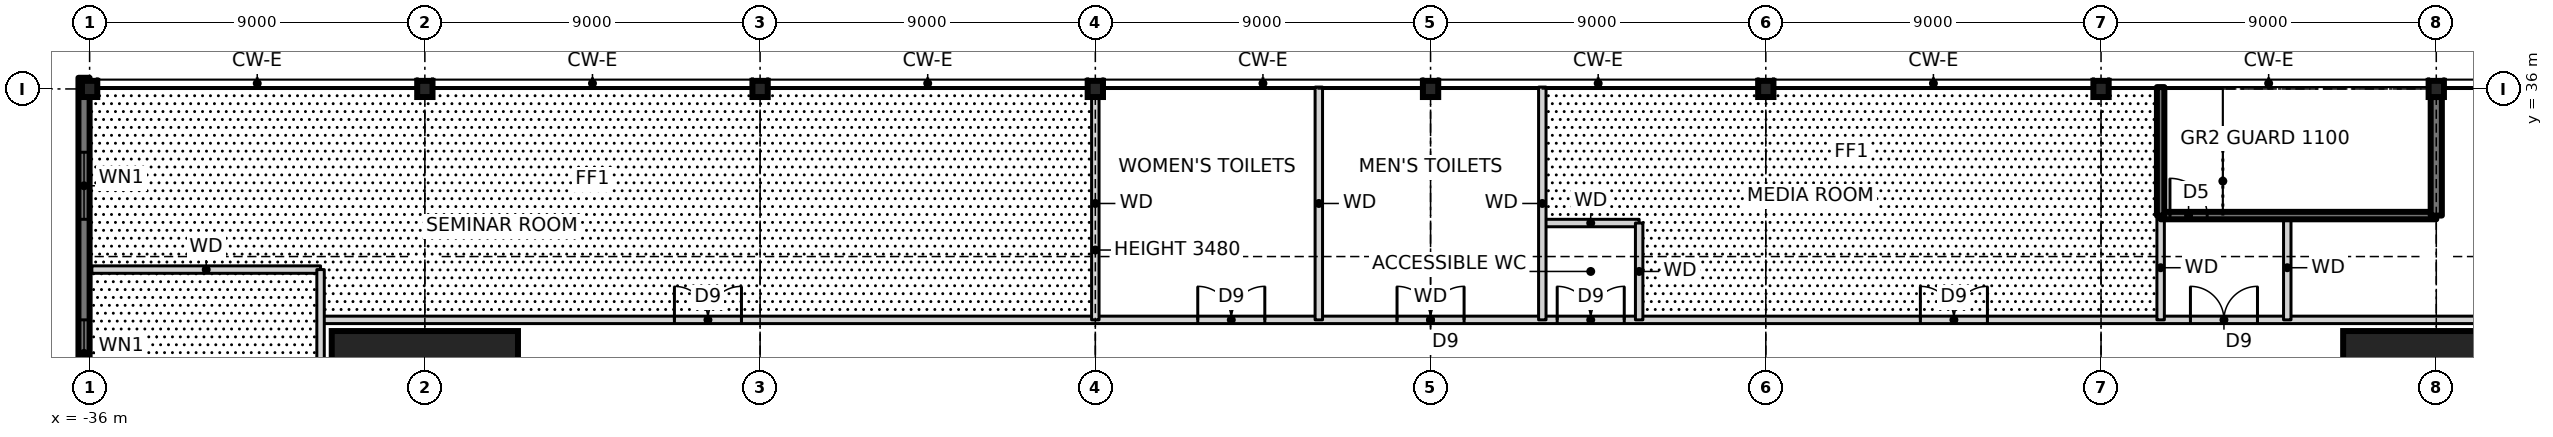
"""IFC4 building model, lengths in metres.
Left out: names, types, materials, properties, quantities, classifications, styles, units other than length and angle.
Written with IfcOpenShell. Run it as: python <this file> out.ifc"""

import sys

from ifc_helpers import new_model, si_unit, direction, frame, frame_2d, origin, origin_2d, place, context, subcontext, project, spatial, rectangle, i_section, extrude, element, fill, save


model = new_model("IFC4")
c1 = context("Model", 3, precision=1e-05, world=origin(), true_north=direction((0.0, 1.0)))
c2 = subcontext(c1, "Body", "Model", "MODEL_VIEW")
j1 = project(units=[si_unit("LENGTHUNIT", "METRE"), si_unit("PLANEANGLEUNIT", "RADIAN")], contexts=[c1])
p1 = place(None, origin())
s1 = spatial("IfcSite", under=j1, at=p1, CompositionType="ELEMENT")
p2 = place(p1, origin())
s2 = spatial("IfcBuilding", under=s1, at=p2, CompositionType="ELEMENT")
p3 = place(p2, frame((0.0, 0.0, 10.5)))
s3 = spatial("IfcBuildingStorey", under=s2, at=p3, CompositionType="ELEMENT", Elevation=10.5)
for number, where, z_axis, x_axis in (
    (1, (27.0, 27.0, 0.0), (0.0, 0.0, 1.0), (1.0, 0.0, 0.0)),
    (2, (-27.0, 27.0, 0.0), (0.0, 0.0, 1.0), (1.0, 0.0, 0.0)),
):
    element("IfcColumn", number, at=place(p3, frame(where, z_axis=z_axis, x_axis=x_axis)), inside=s3, PredefinedType="COLUMN", context=c2, shape_type="SweptSolid", body=[
        extrude(rectangle(XDim=5.0, YDim=5.0, at=origin_2d()), origin(), (0.0, 0.0, 1.0), 4.5),
        extrude(i_section(OverallWidth=0.478, OverallDepth=0.599, WebThickness=0.1, FlangeThickness=0.14, at=origin_2d()), origin(), (0.0, 0.0, 1.0), 4.5),
    ])
for number, where, z_axis, x_axis in (
    (3, (-36.0, 36.0, 0.0), (0.0, 0.0, 1.0), (1.0, 0.0, 0.0)),
    (4, (-27.0, 36.0, 0.0), (0.0, 0.0, 1.0), (1.0, 0.0, 0.0)),
    (5, (-18.0, 36.0, 0.0), (0.0, 0.0, 1.0), (1.0, 0.0, 0.0)),
    (6, (-9.0, 36.0, 0.0), (0.0, 0.0, 1.0), (1.0, 0.0, 0.0)),
    (7, (0.0, 36.0, 0.0), (0.0, 0.0, 1.0), (1.0, 0.0, 0.0)),
    (8, (9.0, 36.0, 0.0), (0.0, 0.0, 1.0), (1.0, 0.0, 0.0)),
    (9, (18.0, 36.0, 0.0), (0.0, 0.0, 1.0), (1.0, 0.0, 0.0)),
    (10, (27.0, 36.0, 0.0), (0.0, 0.0, 1.0), (1.0, 0.0, 0.0)),
):
    element("IfcColumn", number, at=place(p3, frame(where, z_axis=z_axis, x_axis=x_axis)), inside=s3, PredefinedType="COLUMN", context=c2, shape_type="SweptSolid", body=[
        extrude(i_section(OverallWidth=0.411, OverallDepth=0.434, WebThickness=0.036, FlangeThickness=0.057, at=origin_2d()), origin(), (0.0, 0.0, 1.0), 4.5),
    ])
p4 = place(p3, frame((-36.15, 36.3, -0.25), z_axis=(0.0, 0.0, 1.0), x_axis=(0.0, -1.0, 0.0)))
e11 = element("IfcWall", 11, at=p4, inside=s3, PredefinedType="SOLIDWALL", context=c2, shape_type="SweptSolid", body=[
    extrude(rectangle(XDim=72.6, YDim=0.3, at=frame_2d((36.3, 0.0))), origin(), (0.0, 0.0, 1.0), 4.75),
])
p5 = place(p4, frame((2.0, 0.0, 1.15)))
e12 = element("IfcOpeningElement", 12, at=p5, cuts=e11, PredefinedType="OPENING", context=c2, shape_type="SweptSolid", body=[
    extrude(rectangle(XDim=1.8, YDim=2.4, at=frame_2d((0.9, 1.2))), frame((0.0, 0.16, 0.0), z_axis=(0.0, -1.0, 0.0), x_axis=(1.0, 0.0, 0.0)), (0.0, 0.0, 1.0), 0.32),
])
p6 = place(p4, frame((6.5, 0.0, 1.15)))
e13 = element("IfcOpeningElement", 13, at=p6, cuts=e11, PredefinedType="OPENING", context=c2, shape_type="SweptSolid", body=[
    extrude(rectangle(XDim=1.8, YDim=2.4, at=frame_2d((0.9, 1.2))), frame((0.0, 0.16, 0.0), z_axis=(0.0, -1.0, 0.0), x_axis=(1.0, 0.0, 0.0)), (0.0, 0.0, 1.0), 0.32),
])
p7 = place(p4, frame((11.0, 0.0, 1.15)))
e14 = element("IfcOpeningElement", 14, at=p7, cuts=e11, PredefinedType="OPENING", context=c2, shape_type="SweptSolid", body=[
    extrude(rectangle(XDim=1.8, YDim=2.4, at=frame_2d((0.9, 1.2))), frame((0.0, 0.16, 0.0), z_axis=(0.0, -1.0, 0.0), x_axis=(1.0, 0.0, 0.0)), (0.0, 0.0, 1.0), 0.32),
])
p8 = place(p4, frame((15.5, 0.0, 1.15)))
e15 = element("IfcOpeningElement", 15, at=p8, cuts=e11, PredefinedType="OPENING", context=c2, shape_type="SweptSolid", body=[
    extrude(rectangle(XDim=1.8, YDim=2.4, at=frame_2d((0.9, 1.2))), frame((0.0, 0.16, 0.0), z_axis=(0.0, -1.0, 0.0), x_axis=(1.0, 0.0, 0.0)), (0.0, 0.0, 1.0), 0.32),
])
p9 = place(p4, frame((20.0, 0.0, 1.15)))
e16 = element("IfcOpeningElement", 16, at=p9, cuts=e11, PredefinedType="OPENING", context=c2, shape_type="SweptSolid", body=[
    extrude(rectangle(XDim=1.8, YDim=2.4, at=frame_2d((0.9, 1.2))), frame((0.0, 0.16, 0.0), z_axis=(0.0, -1.0, 0.0), x_axis=(1.0, 0.0, 0.0)), (0.0, 0.0, 1.0), 0.32),
])
p10 = place(p4, frame((24.5, 0.0, 1.15)))
e17 = element("IfcOpeningElement", 17, at=p10, cuts=e11, PredefinedType="OPENING", context=c2, shape_type="SweptSolid", body=[
    extrude(rectangle(XDim=1.8, YDim=2.4, at=frame_2d((0.9, 1.2))), frame((0.0, 0.16, 0.0), z_axis=(0.0, -1.0, 0.0), x_axis=(1.0, 0.0, 0.0)), (0.0, 0.0, 1.0), 0.32),
])
p11 = place(p4, frame((29.0, 0.0, 1.15)))
e18 = element("IfcOpeningElement", 18, at=p11, cuts=e11, PredefinedType="OPENING", context=c2, shape_type="SweptSolid", body=[
    extrude(rectangle(XDim=1.8, YDim=2.4, at=frame_2d((0.9, 1.2))), frame((0.0, 0.16, 0.0), z_axis=(0.0, -1.0, 0.0), x_axis=(1.0, 0.0, 0.0)), (0.0, 0.0, 1.0), 0.32),
])
p12 = place(p4, frame((42.5, 0.0, 1.15)))
e19 = element("IfcOpeningElement", 19, at=p12, cuts=e11, PredefinedType="OPENING", context=c2, shape_type="SweptSolid", body=[
    extrude(rectangle(XDim=1.8, YDim=2.4, at=frame_2d((0.9, 1.2))), frame((0.0, 0.16, 0.0), z_axis=(0.0, -1.0, 0.0), x_axis=(1.0, 0.0, 0.0)), (0.0, 0.0, 1.0), 0.32),
])
p13 = place(p4, frame((47.0, 0.0, 1.15)))
e20 = element("IfcOpeningElement", 20, at=p13, cuts=e11, PredefinedType="OPENING", context=c2, shape_type="SweptSolid", body=[
    extrude(rectangle(XDim=1.8, YDim=2.4, at=frame_2d((0.9, 1.2))), frame((0.0, 0.16, 0.0), z_axis=(0.0, -1.0, 0.0), x_axis=(1.0, 0.0, 0.0)), (0.0, 0.0, 1.0), 0.32),
])
p14 = place(p4, frame((51.5, 0.0, 1.15)))
e21 = element("IfcOpeningElement", 21, at=p14, cuts=e11, PredefinedType="OPENING", context=c2, shape_type="SweptSolid", body=[
    extrude(rectangle(XDim=1.8, YDim=2.4, at=frame_2d((0.9, 1.2))), frame((0.0, 0.16, 0.0), z_axis=(0.0, -1.0, 0.0), x_axis=(1.0, 0.0, 0.0)), (0.0, 0.0, 1.0), 0.32),
])
p15 = place(p4, frame((56.0, 0.0, 1.15)))
e22 = element("IfcOpeningElement", 22, at=p15, cuts=e11, PredefinedType="OPENING", context=c2, shape_type="SweptSolid", body=[
    extrude(rectangle(XDim=1.8, YDim=2.4, at=frame_2d((0.9, 1.2))), frame((0.0, 0.16, 0.0), z_axis=(0.0, -1.0, 0.0), x_axis=(1.0, 0.0, 0.0)), (0.0, 0.0, 1.0), 0.32),
])
p16 = place(p4, frame((60.5, 0.0, 1.15)))
e23 = element("IfcOpeningElement", 23, at=p16, cuts=e11, PredefinedType="OPENING", context=c2, shape_type="SweptSolid", body=[
    extrude(rectangle(XDim=1.8, YDim=2.4, at=frame_2d((0.9, 1.2))), frame((0.0, 0.16, 0.0), z_axis=(0.0, -1.0, 0.0), x_axis=(1.0, 0.0, 0.0)), (0.0, 0.0, 1.0), 0.32),
])
p17 = place(p4, frame((65.0, 0.0, 1.15)))
e24 = element("IfcOpeningElement", 24, at=p17, cuts=e11, PredefinedType="OPENING", context=c2, shape_type="SweptSolid", body=[
    extrude(rectangle(XDim=1.8, YDim=2.4, at=frame_2d((0.9, 1.2))), frame((0.0, 0.16, 0.0), z_axis=(0.0, -1.0, 0.0), x_axis=(1.0, 0.0, 0.0)), (0.0, 0.0, 1.0), 0.32),
])
p18 = place(p4, frame((69.5, 0.0, 1.15)))
e25 = element("IfcOpeningElement", 25, at=p18, cuts=e11, PredefinedType="OPENING", context=c2, shape_type="SweptSolid", body=[
    extrude(rectangle(XDim=1.8, YDim=2.4, at=frame_2d((0.9, 1.2))), frame((0.0, 0.16, 0.0), z_axis=(0.0, -1.0, 0.0), x_axis=(1.0, 0.0, 0.0)), (0.0, 0.0, 1.0), 0.32),
])
p19 = place(p3, frame((-29.8, 29.8, 0.0), z_axis=(0.0, 0.0, 1.0), x_axis=(1.0, 0.0, 0.0)))
e26 = element("IfcWall", 26, at=p19, inside=s3, PredefinedType="SOLIDWALL", context=c2, shape_type="SweptSolid", body=[
    extrude(rectangle(XDim=59.6, YDim=0.2, at=frame_2d((29.8, 0.0))), origin(), (0.0, 0.0, 1.0), 4.25),
])
p20 = place(p19, frame((9.5, 0.0, 0.0)))
e27 = element("IfcOpeningElement", 27, at=p20, cuts=e26, PredefinedType="OPENING", context=c2, shape_type="SweptSolid", body=[
    extrude(rectangle(XDim=1.8, YDim=2.1, at=frame_2d((0.9, 1.05))), frame((0.0, 0.11, 0.0), z_axis=(0.0, -1.0, 0.0), x_axis=(1.0, 0.0, 0.0)), (0.0, 0.0, 1.0), 0.22),
])
p21 = place(p19, frame((23.55, 0.0, 0.0)))
e28 = element("IfcOpeningElement", 28, at=p21, cuts=e26, PredefinedType="OPENING", context=c2, shape_type="SweptSolid", body=[
    extrude(rectangle(XDim=1.8, YDim=2.1, at=frame_2d((0.9, 1.05))), frame((0.0, 0.11, 0.0), z_axis=(0.0, -1.0, 0.0), x_axis=(1.0, 0.0, 0.0)), (0.0, 0.0, 1.0), 0.22),
])
p22 = place(p19, frame((28.9, 0.0, 0.0)))
e29 = element("IfcOpeningElement", 29, at=p22, cuts=e26, PredefinedType="OPENING", context=c2, shape_type="SweptSolid", body=[
    extrude(rectangle(XDim=1.8, YDim=2.1, at=frame_2d((0.9, 1.05))), frame((0.0, 0.11, 0.0), z_axis=(0.0, -1.0, 0.0), x_axis=(1.0, 0.0, 0.0)), (0.0, 0.0, 1.0), 0.22),
])
p23 = place(p19, frame((33.2, 0.0, 0.0)))
e30 = element("IfcOpeningElement", 30, at=p23, cuts=e26, PredefinedType="OPENING", context=c2, shape_type="SweptSolid", body=[
    extrude(rectangle(XDim=1.8, YDim=2.1, at=frame_2d((0.9, 1.05))), frame((0.0, 0.11, 0.0), z_axis=(0.0, -1.0, 0.0), x_axis=(1.0, 0.0, 0.0)), (0.0, 0.0, 1.0), 0.22),
])
p24 = place(p19, frame((42.95, 0.0, 0.0)))
e31 = element("IfcOpeningElement", 31, at=p24, cuts=e26, PredefinedType="OPENING", context=c2, shape_type="SweptSolid", body=[
    extrude(rectangle(XDim=1.8, YDim=2.1, at=frame_2d((0.9, 1.05))), frame((0.0, 0.11, 0.0), z_axis=(0.0, -1.0, 0.0), x_axis=(1.0, 0.0, 0.0)), (0.0, 0.0, 1.0), 0.22),
])
p25 = place(p19, frame((50.2, 0.0, 0.0)))
e32 = element("IfcOpeningElement", 32, at=p25, cuts=e26, PredefinedType="OPENING", context=c2, shape_type="SweptSolid", body=[
    extrude(rectangle(XDim=1.8, YDim=2.1, at=frame_2d((0.9, 1.05))), frame((0.0, 0.11, 0.0), z_axis=(0.0, -1.0, 0.0), x_axis=(1.0, 0.0, 0.0)), (0.0, 0.0, 1.0), 0.22),
])
p26 = place(p3, frame((-35.94, 31.15, 0.0), z_axis=(0.0, 0.0, 1.0), x_axis=(1.0, 0.0, 0.0)))
e33 = element("IfcWall", 33, at=p26, inside=s3, PredefinedType="SOLIDWALL", context=c2, shape_type="SweptSolid", body=[
    extrude(rectangle(XDim=6.14, YDim=0.2, at=frame_2d((3.07, 0.0))), origin(), (0.0, 0.0, 1.0), 4.25),
])
p27 = place(p3, frame((3.0, 32.4, 0.0), z_axis=(0.0, 0.0, 1.0), x_axis=(1.0, 0.0, 0.0)))
e34 = element("IfcWall", 34, at=p27, inside=s3, PredefinedType="SOLIDWALL", context=c2, shape_type="SweptSolid", body=[
    extrude(rectangle(XDim=2.6, YDim=0.2, at=frame_2d((1.3, 0.0))), origin(), (0.0, 0.0, 1.0), 4.25),
])
p28 = place(p3, frame((19.6, 32.6, 0.0), z_axis=(0.0, 0.0, 1.0), x_axis=(1.0, 0.0, 0.0)))
e35 = element("IfcWall", 35, at=p28, inside=s3, PredefinedType="SOLIDWALL", context=c2, shape_type="SweptSolid", body=[
    extrude(rectangle(XDim=7.4, YDim=0.2, at=frame_2d((3.7, 0.0))), origin(), (0.0, 0.0, 1.0), 4.5),
])
p29 = place(p28, frame((0.25, 0.0, 0.0)))
e36 = element("IfcOpeningElement", 36, at=p29, cuts=e35, PredefinedType="OPENING", context=c2, shape_type="SweptSolid", body=[
    extrude(rectangle(XDim=1.0, YDim=2.1, at=frame_2d((0.5, 1.05))), frame((0.0, 0.11, 0.0), z_axis=(0.0, -1.0, 0.0), x_axis=(1.0, 0.0, 0.0)), (0.0, 0.0, 1.0), 0.22),
])
p30 = place(p3, frame((27.0, 32.6, 0.0), z_axis=(0.0, 0.0, 1.0), x_axis=(0.0, 1.0, 0.0)))
e37 = element("IfcWall", 37, at=p30, inside=s3, PredefinedType="SOLIDWALL", context=c2, shape_type="SweptSolid", body=[
    extrude(rectangle(XDim=3.183, YDim=0.3, at=frame_2d((1.591, 0.0))), origin(), (0.0, 0.0, 1.0), 4.5),
])
for number, where, z_axis, x_axis in (
    (38, (23.0, 29.8, 0.0), (0.0, 0.0, 1.0), (0.0, 1.0, 0.0)),
    (39, (19.6, 29.8, 0.0), (0.0, 0.0, 1.0), (0.0, 1.0, 0.0)),
):
    element("IfcWall", number, at=place(p3, frame(where, z_axis=z_axis, x_axis=x_axis)), inside=s3, PredefinedType="SOLIDWALL", context=c2, shape_type="SweptSolid", body=[
        extrude(rectangle(XDim=2.8, YDim=0.2, at=frame_2d((1.4, 0.0))), origin(), (0.0, 0.0, 1.0), 4.25),
    ])
p31 = place(p3, frame((19.6, 32.6, 0.0), z_axis=(0.0, 0.0, 1.0), x_axis=(0.0, 1.0, 0.0)))
e40 = element("IfcWall", 40, at=p31, inside=s3, PredefinedType="SOLIDWALL", context=c2, shape_type="SweptSolid", body=[
    extrude(rectangle(XDim=3.45, YDim=0.2, at=frame_2d((1.725, 0.0))), origin(), (0.0, 0.0, 1.0), 4.5),
])
p32 = place(p3, frame((5.6, 29.8, 0.0), z_axis=(0.0, 0.0, 1.0), x_axis=(0.0, 1.0, 0.0)))
e41 = element("IfcWall", 41, at=p32, inside=s3, PredefinedType="SOLIDWALL", context=c2, shape_type="SweptSolid", body=[
    extrude(rectangle(XDim=2.6, YDim=0.2, at=frame_2d((1.3, 0.0))), origin(), (0.0, 0.0, 1.0), 4.25),
])
for number, where, z_axis, x_axis in (
    (42, (3.0, 29.8, 0.0), (0.0, 0.0, 1.0), (0.0, 1.0, 0.0)),
    (43, (-3.0, 29.8, 0.0), (0.0, 0.0, 1.0), (0.0, 1.0, 0.0)),
):
    element("IfcWall", number, at=place(p3, frame(where, z_axis=z_axis, x_axis=x_axis)), inside=s3, PredefinedType="SOLIDWALL", context=c2, shape_type="SweptSolid", body=[
        extrude(rectangle(XDim=6.25, YDim=0.2, at=frame_2d((3.125, 0.0))), origin(), (0.0, 0.0, 1.0), 4.25),
    ])
p33 = place(p3, frame((-9.0, 29.8, 0.0), z_axis=(0.0, 0.0, 1.0), x_axis=(0.0, 1.0, 0.0)))
e44 = element("IfcWall", 44, at=p33, inside=s3, PredefinedType="SOLIDWALL", context=c2, shape_type="SweptSolid", body=[
    extrude(rectangle(XDim=6.25, YDim=0.2, at=frame_2d((3.125, 0.0))), origin(), (0.0, 0.0, 1.0), 3.48),
])
p34 = place(p3, frame((-29.8, -31.4, 0.0), z_axis=(0.0, 0.0, 1.0), x_axis=(0.0, 1.0, 0.0)))
e45 = element("IfcWall", 45, at=p34, inside=s3, PredefinedType="SOLIDWALL", context=c2, shape_type="SweptSolid", body=[
    extrude(rectangle(XDim=62.55, YDim=0.2, at=frame_2d((31.275, 0.0))), origin(), (0.0, 0.0, 1.0), 4.25),
])
p35 = place(p34, frame((8.675, 0.0, 0.0)))
e46 = element("IfcOpeningElement", 46, at=p35, cuts=e45, PredefinedType="OPENING", context=c2, shape_type="SweptSolid", body=[
    extrude(rectangle(XDim=1.8, YDim=2.1, at=frame_2d((0.9, 1.05))), frame((0.0, 0.11, 0.0), z_axis=(0.0, -1.0, 0.0), x_axis=(1.0, 0.0, 0.0)), (0.0, 0.0, 1.0), 0.22),
])
p36 = place(p34, frame((25.175, 0.0, 0.0)))
e47 = element("IfcOpeningElement", 47, at=p36, cuts=e45, PredefinedType="OPENING", context=c2, shape_type="SweptSolid", body=[
    extrude(rectangle(XDim=1.8, YDim=2.1, at=frame_2d((0.9, 1.05))), frame((0.0, 0.11, 0.0), z_axis=(0.0, -1.0, 0.0), x_axis=(1.0, 0.0, 0.0)), (0.0, 0.0, 1.0), 0.22),
])
p37 = place(p34, frame((30.5, 0.0, 0.0)))
e48 = element("IfcOpeningElement", 48, at=p37, cuts=e45, PredefinedType="OPENING", context=c2, shape_type="SweptSolid", body=[
    extrude(rectangle(XDim=1.8, YDim=2.1, at=frame_2d((0.9, 1.05))), frame((0.0, 0.11, 0.0), z_axis=(0.0, -1.0, 0.0), x_axis=(1.0, 0.0, 0.0)), (0.0, 0.0, 1.0), 0.22),
])
p38 = place(p34, frame((35.85, 0.0, 0.0)))
e49 = element("IfcOpeningElement", 49, at=p38, cuts=e45, PredefinedType="OPENING", context=c2, shape_type="SweptSolid", body=[
    extrude(rectangle(XDim=1.8, YDim=2.1, at=frame_2d((0.9, 1.05))), frame((0.0, 0.11, 0.0), z_axis=(0.0, -1.0, 0.0), x_axis=(1.0, 0.0, 0.0)), (0.0, 0.0, 1.0), 0.22),
])
p39 = place(p34, frame((49.9, 0.0, 0.0)))
e50 = element("IfcOpeningElement", 50, at=p39, cuts=e45, PredefinedType="OPENING", context=c2, shape_type="SweptSolid", body=[
    extrude(rectangle(XDim=1.8, YDim=2.1, at=frame_2d((0.9, 1.05))), frame((0.0, 0.11, 0.0), z_axis=(0.0, -1.0, 0.0), x_axis=(1.0, 0.0, 0.0)), (0.0, 0.0, 1.0), 0.22),
])
p40 = place(p5, origin())
e51 = element("IfcWindow", 51, at=p40, inside=s3, PartitioningType="SINGLE_PANEL", PredefinedType="WINDOW", context=c2, shape_type="SweptSolid", body=[
    extrude(rectangle(XDim=1.8, YDim=2.4, at=frame_2d((0.9, 1.2))), frame((0.0, 0.03, 0.0), z_axis=(0.0, -1.0, 0.0), x_axis=(1.0, 0.0, 0.0)), (0.0, 0.0, 1.0), 0.06),
])
fill(e12, e51)
p41 = place(p6, origin())
e52 = element("IfcWindow", 52, at=p41, inside=s3, PartitioningType="SINGLE_PANEL", PredefinedType="WINDOW", context=c2, shape_type="SweptSolid", body=[
    extrude(rectangle(XDim=1.8, YDim=2.4, at=frame_2d((0.9, 1.2))), frame((0.0, 0.03, 0.0), z_axis=(0.0, -1.0, 0.0), x_axis=(1.0, 0.0, 0.0)), (0.0, 0.0, 1.0), 0.06),
])
fill(e13, e52)
p42 = place(p20, origin())
e53 = element("IfcDoor", 53, at=p42, inside=s3, OperationType="DOUBLE_DOOR_SINGLE_SWING", PredefinedType="DOOR", context=c2, shape_type="SweptSolid", body=[
    extrude(rectangle(XDim=1.8, YDim=2.1, at=frame_2d((0.9, 1.05))), frame((0.0, 0.025, 0.0), z_axis=(0.0, -1.0, 0.0), x_axis=(1.0, 0.0, 0.0)), (0.0, 0.0, 1.0), 0.05),
])
fill(e27, e53)
p43 = place(p21, origin())
e54 = element("IfcDoor", 54, at=p43, inside=s3, OperationType="DOUBLE_DOOR_SINGLE_SWING", PredefinedType="DOOR", context=c2, shape_type="SweptSolid", body=[
    extrude(rectangle(XDim=1.8, YDim=2.1, at=frame_2d((0.9, 1.05))), frame((0.0, 0.025, 0.0), z_axis=(0.0, -1.0, 0.0), x_axis=(1.0, 0.0, 0.0)), (0.0, 0.0, 1.0), 0.05),
])
fill(e28, e54)
p44 = place(p22, origin())
e55 = element("IfcDoor", 55, at=p44, inside=s3, OperationType="DOUBLE_DOOR_SINGLE_SWING", PredefinedType="DOOR", context=c2, shape_type="SweptSolid", body=[
    extrude(rectangle(XDim=1.8, YDim=2.1, at=frame_2d((0.9, 1.05))), frame((0.0, 0.025, 0.0), z_axis=(0.0, -1.0, 0.0), x_axis=(1.0, 0.0, 0.0)), (0.0, 0.0, 1.0), 0.05),
])
fill(e29, e55)
p45 = place(p23, origin())
e56 = element("IfcDoor", 56, at=p45, inside=s3, OperationType="DOUBLE_DOOR_SINGLE_SWING", PredefinedType="DOOR", context=c2, shape_type="SweptSolid", body=[
    extrude(rectangle(XDim=1.8, YDim=2.1, at=frame_2d((0.9, 1.05))), frame((0.0, 0.025, 0.0), z_axis=(0.0, -1.0, 0.0), x_axis=(1.0, 0.0, 0.0)), (0.0, 0.0, 1.0), 0.05),
])
fill(e30, e56)
p46 = place(p24, origin())
e57 = element("IfcDoor", 57, at=p46, inside=s3, OperationType="DOUBLE_DOOR_SINGLE_SWING", PredefinedType="DOOR", context=c2, shape_type="SweptSolid", body=[
    extrude(rectangle(XDim=1.8, YDim=2.1, at=frame_2d((0.9, 1.05))), frame((0.0, 0.025, 0.0), z_axis=(0.0, -1.0, 0.0), x_axis=(1.0, 0.0, 0.0)), (0.0, 0.0, 1.0), 0.05),
])
fill(e31, e57)
p47 = place(p25, origin())
e58 = element("IfcDoor", 58, at=p47, inside=s3, OperationType="DOUBLE_DOOR_SINGLE_SWING", PredefinedType="DOOR", context=c2, shape_type="SweptSolid", body=[
    extrude(rectangle(XDim=1.8, YDim=2.1, at=frame_2d((0.9, 1.05))), frame((0.0, 0.025, 0.0), z_axis=(0.0, -1.0, 0.0), x_axis=(1.0, 0.0, 0.0)), (0.0, 0.0, 1.0), 0.05),
])
fill(e32, e58)
p48 = place(p29, origin())
e59 = element("IfcDoor", 59, at=p48, inside=s3, OperationType="SINGLE_SWING_LEFT", PredefinedType="DOOR", context=c2, shape_type="SweptSolid", body=[
    extrude(rectangle(XDim=1.0, YDim=2.1, at=frame_2d((0.5, 1.05))), frame((0.0, 0.025, 0.0), z_axis=(0.0, -1.0, 0.0), x_axis=(1.0, 0.0, 0.0)), (0.0, 0.0, 1.0), 0.05),
])
fill(e36, e59)
save(model, sys.argv[1])
